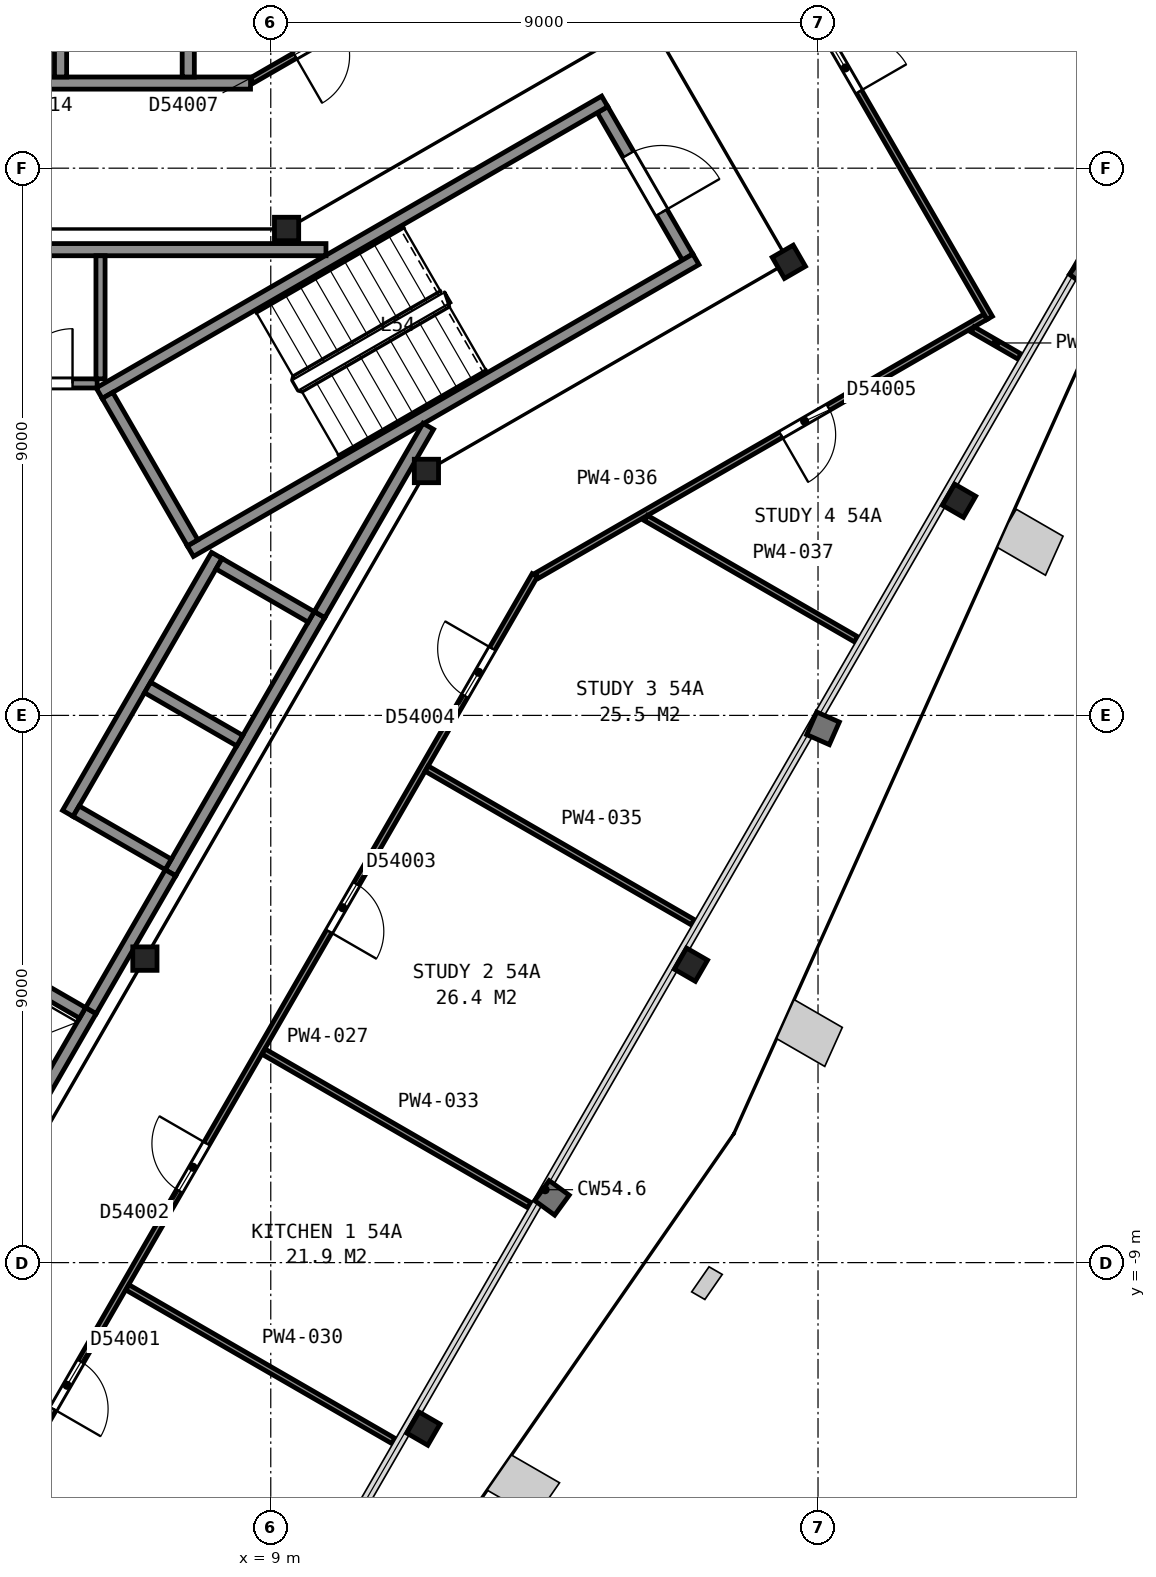
"""IFC4 building model, lengths in metres.
Left out: names, types, materials, properties, quantities, classifications, styles, units other than length and angle.
Written with IfcOpenShell. Run it as: python <this file> out.ifc"""

import sys

from ifc_helpers import new_model, si_unit, direction, frame, frame_2d, origin, origin_2d, place, context, subcontext, project, spatial, rectangle, i_section, extrude, element, fill, save


model = new_model("IFC4")
c1 = context("Model", 3, precision=1e-05, world=origin(), true_north=direction((0.0, 1.0)))
c2 = subcontext(c1, "Body", "Model", "MODEL_VIEW")
j1 = project(units=[si_unit("LENGTHUNIT", "METRE"), si_unit("PLANEANGLEUNIT", "RADIAN")], contexts=[c1])
p1 = place(None, origin())
s1 = spatial("IfcSite", under=j1, at=p1, CompositionType="ELEMENT")
p2 = place(p1, origin())
s2 = spatial("IfcBuilding", under=s1, at=p2, CompositionType="ELEMENT")
p3 = place(p2, frame((0.0, 0.0, 217.5)))
s3 = spatial("IfcBuildingStorey", under=s2, at=p3, CompositionType="ELEMENT", Elevation=217.5)
for number, where, z_axis, x_axis in (
    (1, (11.51, -11.73, 0.035), (0.0, 0.0, 1.0), (-0.5, -0.866, 0.0)),
    (2, (15.91, -4.1, 0.035), (0.0, 0.0, 1.0), (-0.5, -0.866, 0.0)),
):
    element("IfcColumn", number, at=place(p3, frame(where, z_axis=z_axis, x_axis=x_axis)), inside=s3, PredefinedType="COLUMN", context=c2, shape_type="SweptSolid", body=[
        extrude(i_section(OverallWidth=0.401, OverallDepth=0.399, WebThickness=0.025, FlangeThickness=0.04, FilletRadius=0.015, at=origin_2d()), origin(), (0.0, 0.0, 1.0), 3.665),
    ])
p4 = place(p3, frame((20.32, 3.53, 0.04), z_axis=(0.0, 0.0, 1.0), x_axis=(-0.5, -0.866025403784, 0.0)))
e3 = element("IfcColumn", 3, at=p4, inside=s3, PredefinedType="COLUMN", context=c2, shape_type="SweptSolid", body=[
    extrude(i_section(OverallWidth=0.401, OverallDepth=0.399, WebThickness=0.025, FlangeThickness=0.04, FilletRadius=0.015, at=origin_2d()), origin(), (0.0, 0.0, 1.0), 3.66),
])
p5 = place(p3, frame((11.56, 4.02, 0.0), z_axis=(0.0, 0.0, 1.0), x_axis=(1.0, 0.0, 0.0)))
e4 = element("IfcColumn", 4, at=p5, inside=s3, PredefinedType="COLUMN", context=c2, shape_type="SweptSolid", body=[
    extrude(i_section(OverallWidth=0.399, OverallDepth=0.386, WebThickness=0.021, FlangeThickness=0.033, FilletRadius=0.015, at=origin_2d()), origin(), (0.0, 0.0, 1.0), 3.7),
])
p6 = place(p3, frame((17.52, 7.46, 0.0), z_axis=(0.0, 0.0, 1.0), x_axis=(0.5, -0.866025403784, 0.0)))
e5 = element("IfcColumn", 5, at=p6, inside=s3, PredefinedType="COLUMN", context=c2, shape_type="SweptSolid", body=[
    extrude(i_section(OverallWidth=0.401, OverallDepth=0.399, WebThickness=0.025, FlangeThickness=0.04, FilletRadius=0.015, at=origin_2d()), origin(), (0.0, 0.0, 1.0), 3.7),
])
for number, where, z_axis, x_axis in (
    (6, (9.26, 8.0, 0.0), (0.0, 0.0, 1.0), (1.0, 0.0, 0.0)),
    (7, (6.93, -4.0, 0.0), (0.0, 0.0, 1.0), (1.0, 0.0, 0.0)),
):
    element("IfcColumn", number, at=place(p3, frame(where, z_axis=z_axis, x_axis=x_axis)), inside=s3, PredefinedType="COLUMN", context=c2, shape_type="SweptSolid", body=[
        extrude(i_section(OverallWidth=0.399, OverallDepth=0.386, WebThickness=0.021, FlangeThickness=0.033, FilletRadius=0.015, at=origin_2d()), origin(), (0.0, 0.0, 1.0), 3.7),
    ])
p7 = place(p3, frame((15.855, 7.538, 0.0), z_axis=(0.0, 0.0, 1.0), x_axis=(-0.500049511043, 0.865996816683, 0.0)))
e8 = element("IfcWall", 8, at=p7, inside=s3, PredefinedType="PARTITIONING", context=c2, shape_type="SweptSolid", body=[
    extrude(rectangle(XDim=2.8, YDim=0.2, at=frame_2d((1.4, 0.0))), origin(), (0.0, 0.0, 1.0), 3.45),
])
p8 = place(p7, frame((0.85, 0.0, 0.0)))
e9 = element("IfcOpeningElement", 9, at=p8, cuts=e8, PredefinedType="OPENING", context=c2, shape_type="SweptSolid", body=[
    extrude(rectangle(XDim=1.1, YDim=2.1, at=frame_2d((0.55, 1.05))), frame((0.0, 0.11, 0.0), z_axis=(0.0, -1.0, 0.0), x_axis=(1.0, 0.0, 0.0)), (0.0, 0.0, 1.0), 0.22),
])
for number, where, z_axis, x_axis in (
    (10, (6.178, 5.299, 0.0), (0.0, 0.0, 1.0), (0.866, 0.5, 0.0)),
    (11, (7.678, 2.701, 0.0), (0.0, 0.0, 1.0), (0.866, 0.5, 0.0)),
):
    element("IfcWall", number, at=place(p3, frame(where, z_axis=z_axis, x_axis=x_axis)), inside=s3, PredefinedType="PARTITIONING", context=c2, shape_type="SweptSolid", body=[
        extrude(rectangle(XDim=9.6, YDim=0.2, at=frame_2d((4.8, 0.0))), origin(), (0.0, 0.0, 1.0), 3.45),
    ])
p9 = place(p3, frame((7.715, 2.838, 0.0), z_axis=(0.0, 0.0, 1.0), x_axis=(-0.500049511043, 0.865996816683, 0.0)))
e12 = element("IfcWall", 12, at=p9, inside=s3, PredefinedType="PARTITIONING", context=c2, shape_type="SweptSolid", body=[
    extrude(rectangle(XDim=2.8, YDim=0.2, at=frame_2d((1.4, 0.0))), origin(), (0.0, 0.0, 1.0), 3.45),
])
p10 = place(p3, frame((4.766, -7.065, 0.0), z_axis=(0.0, 0.0, 1.0), x_axis=(0.499948979701, 0.866054858364, 0.0)))
e13 = element("IfcWall", 13, at=p10, inside=s3, PredefinedType="PARTITIONING", context=c2, shape_type="SweptSolid", body=[
    extrude(rectangle(XDim=2.55, YDim=0.2, at=frame_2d((1.275, 0.0))), origin(), (0.0, 0.0, 1.0), 3.7),
])
p11 = place(p3, frame((7.351, -2.587, 0.0), z_axis=(0.0, 0.0, 1.0), x_axis=(0.500002801628, 0.866023786258, 0.0)))
e14 = element("IfcWall", 14, at=p11, inside=s3, PredefinedType="PARTITIONING", context=c2, shape_type="SweptSolid", body=[
    extrude(rectangle(XDim=4.9, YDim=0.2, at=frame_2d((2.45, 0.0))), origin(), (0.0, 0.0, 1.0), 3.7),
])
p12 = place(p3, frame((5.663, -1.612, 0.0), z_axis=(0.0, 0.0, 1.0), x_axis=(0.49998122708, 0.866036242063, 0.0)))
e15 = element("IfcWall", 15, at=p12, inside=s3, PredefinedType="PARTITIONING", context=c2, shape_type="SweptSolid", body=[
    extrude(rectangle(XDim=4.9, YDim=0.2, at=frame_2d((2.45, 0.0))), origin(), (0.0, 0.0, 1.0), 3.7),
])
p13 = place(p3, frame((9.665, 1.62, 0.0), z_axis=(0.0, 0.0, 1.0), x_axis=(-0.866002029911, 0.500040482552, 0.0)))
e16 = element("IfcWall", 16, at=p13, inside=s3, PredefinedType="PARTITIONING", context=c2, shape_type="SweptSolid", body=[
    extrude(rectangle(XDim=1.75, YDim=0.2, at=frame_2d((0.875, 0.0))), origin(), (0.0, 0.0, 1.0), 3.7),
])
for number, where, z_axis, x_axis in (
    (17, (8.49, -0.416, 0.0), (0.0, 0.0, 1.0), (-0.866, 0.5, 0.0)),
    (18, (7.315, -2.451, 0.0), (0.0, 0.0, 1.0), (-0.866, 0.5, 0.0)),
):
    element("IfcWall", number, at=place(p3, frame(where, z_axis=z_axis, x_axis=x_axis)), inside=s3, PredefinedType="PARTITIONING", context=c2, shape_type="SweptSolid", body=[
        extrude(rectangle(XDim=1.75, YDim=0.2, at=frame_2d((0.875, 0.0))), origin(), (0.0, 0.0, 1.0), 3.7),
    ])
p14 = place(p3, frame((5.905, -4.893, 0.0), z_axis=(0.0, 0.0, 1.0), x_axis=(-0.866002029911, 0.500040482552, 0.0)))
e19 = element("IfcWall", 19, at=p14, inside=s3, PredefinedType="PARTITIONING", context=c2, shape_type="SweptSolid", body=[
    extrude(rectangle(XDim=1.75, YDim=0.2, at=frame_2d((0.875, 0.0))), origin(), (0.0, 0.0, 1.0), 3.7),
])
p15 = place(p3, frame((-3.933, 7.66, 0.0), z_axis=(0.0, 0.0, 1.0), x_axis=(1.0, 0.0, 0.0)))
e20 = element("IfcWall", 20, at=p15, inside=s3, PredefinedType="PARTITIONING", context=c2, shape_type="SweptSolid", body=[
    extrude(rectangle(XDim=13.841, YDim=0.2, at=frame_2d((6.92, 0.0))), origin(), (0.0, 0.0, 1.0), 3.45),
])
p16 = place(p3, frame((0.925, 5.46, 0.0), z_axis=(0.0, 0.0, 1.0), x_axis=(1.0, 0.0, 0.0)))
e21 = element("IfcWall", 21, at=p16, inside=s3, PredefinedType="PARTITIONING", context=c2, shape_type="SweptSolid", body=[
    extrude(rectangle(XDim=5.22, YDim=0.15, at=frame_2d((2.61, 0.0))), origin(), (0.0, 0.0, 1.0), 3.45),
])
p17 = place(p16, frame((3.915, 0.0, 0.0)))
e22 = element("IfcOpeningElement", 22, at=p17, cuts=e21, PredefinedType="OPENING", context=c2, shape_type="SweptSolid", body=[
    extrude(rectangle(XDim=0.9, YDim=2.1, at=frame_2d((0.45, 1.05))), frame((0.0, 0.085, 0.0), z_axis=(0.0, -1.0, 0.0), x_axis=(1.0, 0.0, 0.0)), (0.0, 0.0, 1.0), 0.17),
])
p18 = place(p3, frame((6.042, -4.855, 0.0), z_axis=(0.0, 0.0, 1.0), x_axis=(0.500252727967, 0.865879442048, 0.0)))
e23 = element("IfcWall", 23, at=p18, inside=s3, PredefinedType="PARTITIONING", context=c2, shape_type="SweptSolid", body=[
    extrude(rectangle(XDim=2.617, YDim=0.2, at=frame_2d((1.309, 0.0))), origin(), (0.0, 0.0, 1.0), 3.45),
])
p19 = place(p3, frame((6.2, 5.535, 0.0), z_axis=(0.0, 0.0, 1.0), x_axis=(0.0, 1.0, 0.0)))
e24 = element("IfcWall", 24, at=p19, inside=s3, PredefinedType="PARTITIONING", context=c2, shape_type="SweptSolid", body=[
    extrude(rectangle(XDim=2.025, YDim=0.15, at=frame_2d((1.013, 0.0))), origin(), (0.0, 0.0, 1.0), 3.45),
])
p20 = place(p3, frame((9.803, 1.658, 0.0), z_axis=(0.0, 0.0, 1.0), x_axis=(0.499943114462, 0.866058244174, 0.0)))
e25 = element("IfcWall", 25, at=p20, inside=s3, PredefinedType="PARTITIONING", context=c2, shape_type="SweptSolid", body=[
    extrude(rectangle(XDim=3.576, YDim=0.2, at=frame_2d((1.788, 0.0))), origin(), (0.0, 0.0, 1.0), 3.45),
])
p21 = place(p3, frame((-8.667, 10.4, 0.0), z_axis=(0.0, 0.0, 1.0), x_axis=(1.0, 0.0, 0.0)))
e26 = element("IfcWall", 26, at=p21, inside=s3, PredefinedType="PARTITIONING", context=c2, shape_type="SweptSolid", body=[
    extrude(rectangle(XDim=17.334, YDim=0.2, at=frame_2d((8.667, 0.0))), origin(), (0.0, 0.0, 1.0), 2.713),
])
p22 = place(p21, frame((9.252, 0.0, 0.0)))
e27 = element("IfcOpeningElement", 27, at=p22, cuts=e26, PredefinedType="OPENING", context=c2, shape_type="SweptSolid", body=[
    extrude(rectangle(XDim=0.9, YDim=2.1, at=frame_2d((0.45, 1.05))), frame((0.0, 0.11, 0.0), z_axis=(0.0, -1.0, 0.0), x_axis=(1.0, 0.0, 0.0)), (0.0, 0.0, 1.0), 0.22),
])
p23 = place(p21, frame((4.851, 0.0, 0.0)))
e28 = element("IfcOpeningElement", 28, at=p23, cuts=e26, PredefinedType="OPENING", context=c2, shape_type="SweptSolid", body=[
    extrude(rectangle(XDim=0.9, YDim=2.1, at=frame_2d((0.45, 1.05))), frame((0.0, 0.11, 0.0), z_axis=(0.0, -1.0, 0.0), x_axis=(1.0, 0.0, 0.0)), (0.0, 0.0, 1.0), 0.22),
])
p24 = place(p3, frame((13.342, 2.306, 0.0), z_axis=(0.0, 0.0, 1.0), x_axis=(-0.49997440863, -0.866040178465, 0.0)))
e29 = element("IfcWall", 29, at=p24, inside=s3, PredefinedType="PARTITIONING", context=c2, shape_type="SweptSolid", body=[
    extrude(rectangle(XDim=17.335, YDim=0.1, at=frame_2d((8.667, 0.0))), origin(), (0.0, 0.0, 1.0), 2.713),
])
p25 = place(p24, frame((14.935, 0.0, 0.0)))
e30 = element("IfcOpeningElement", 30, at=p25, cuts=e29, PredefinedType="OPENING", context=c2, shape_type="SweptSolid", body=[
    extrude(rectangle(XDim=0.9, YDim=2.1, at=frame_2d((0.45, 1.05))), frame((0.0, 0.06, 0.0), z_axis=(0.0, -1.0, 0.0), x_axis=(1.0, 0.0, 0.0)), (0.0, 0.0, 1.0), 0.12),
])
p26 = place(p24, frame((10.794, 0.0, 0.0)))
e31 = element("IfcOpeningElement", 31, at=p26, cuts=e29, PredefinedType="OPENING", context=c2, shape_type="SweptSolid", body=[
    extrude(rectangle(XDim=0.9, YDim=2.1, at=frame_2d((0.45, 1.05))), frame((0.0, 0.06, 0.0), z_axis=(0.0, -1.0, 0.0), x_axis=(1.0, 0.0, 0.0)), (0.0, 0.0, 1.0), 0.12),
])
p27 = place(p24, frame((5.866, 0.0, 0.0)))
e32 = element("IfcOpeningElement", 32, at=p27, cuts=e29, PredefinedType="OPENING", context=c2, shape_type="SweptSolid", body=[
    extrude(rectangle(XDim=0.9, YDim=2.1, at=frame_2d((0.45, 1.05))), frame((0.0, 0.06, 0.0), z_axis=(0.0, -1.0, 0.0), x_axis=(1.0, 0.0, 0.0)), (0.0, 0.0, 1.0), 0.12),
])
p28 = place(p24, frame((1.395, 0.0, 0.0)))
e33 = element("IfcOpeningElement", 33, at=p28, cuts=e29, PredefinedType="OPENING", context=c2, shape_type="SweptSolid", body=[
    extrude(rectangle(XDim=0.9, YDim=2.1, at=frame_2d((0.45, 1.05))), frame((0.0, 0.06, 0.0), z_axis=(0.0, -1.0, 0.0), x_axis=(1.0, 0.0, 0.0)), (0.0, 0.0, 1.0), 0.12),
])
p29 = place(p3, frame((5.543, 10.5, 0.0), z_axis=(0.0, 0.0, 1.0), x_axis=(0.0, 1.0, 0.0)))
e34 = element("IfcWall", 34, at=p29, inside=s3, PredefinedType="PARTITIONING", context=c2, shape_type="SweptSolid", body=[
    extrude(rectangle(XDim=5.006, YDim=0.2, at=frame_2d((2.503, 0.0))), origin(), (0.0, 0.0, 1.0), 2.713),
])
p30 = place(p3, frame((6.643, -9.407, 0.0), z_axis=(0.0, 0.0, 1.0), x_axis=(0.866056765328, -0.499945676278, 0.0)))
e35 = element("IfcWall", 35, at=p30, inside=s3, PredefinedType="PARTITIONING", context=c2, shape_type="SweptSolid", body=[
    extrude(rectangle(XDim=5.049, YDim=0.1, at=frame_2d((2.525, 0.0))), origin(), (0.0, 0.0, 1.0), 2.713),
])
p31 = place(p3, frame((7.643, 10.5, 0.0), z_axis=(0.0, 0.0, 1.0), x_axis=(0.0, 1.0, 0.0)))
e36 = element("IfcWall", 36, at=p31, inside=s3, PredefinedType="PARTITIONING", context=c2, shape_type="SweptSolid", body=[
    extrude(rectangle(XDim=2.8, YDim=0.2, at=frame_2d((1.4, 0.0))), origin(), (0.0, 0.0, 1.0), 2.713),
])
p32 = place(p3, frame((8.691, 10.442, 0.0), z_axis=(0.0, 0.0, 1.0), x_axis=(0.866070360466, 0.499922124658, 0.0)))
e37 = element("IfcWall", 37, at=p32, inside=s3, PredefinedType="PARTITIONING", context=c2, shape_type="SweptSolid", body=[
    extrude(rectangle(XDim=8.503, YDim=0.1, at=frame_2d((4.251, 0.0))), origin(), (0.0, 0.0, 1.0), 2.713),
])
p33 = place(p32, frame((0.815, 0.0, 0.0)))
e38 = element("IfcOpeningElement", 38, at=p33, cuts=e37, PredefinedType="OPENING", context=c2, shape_type="SweptSolid", body=[
    extrude(rectangle(XDim=0.9, YDim=2.1, at=frame_2d((0.45, 1.05))), frame((0.0, 0.06, 0.0), z_axis=(0.0, -1.0, 0.0), x_axis=(1.0, 0.0, 0.0)), (0.0, 0.0, 1.0), 0.12),
])
p34 = place(p3, frame((8.882, -5.53, 0.0), z_axis=(0.0, 0.0, 1.0), x_axis=(0.865915800513, -0.500189790402, 0.0)))
e39 = element("IfcWall", 39, at=p34, inside=s3, PredefinedType="PARTITIONING", context=c2, shape_type="SweptSolid", body=[
    extrude(rectangle(XDim=5.049, YDim=0.1, at=frame_2d((2.525, 0.0))), origin(), (0.0, 0.0, 1.0), 2.713),
])
p35 = place(p3, frame((11.563, -0.875, 0.0), z_axis=(0.0, 0.0, 1.0), x_axis=(0.866052865344, -0.499952432166, 0.0)))
e40 = element("IfcWall", 40, at=p35, inside=s3, PredefinedType="PARTITIONING", context=c2, shape_type="SweptSolid", body=[
    extrude(rectangle(XDim=5.054, YDim=0.1, at=frame_2d((2.527, 0.0))), origin(), (0.0, 0.0, 1.0), 2.713),
])
p36 = place(p3, frame((20.756, 6.557, 0.0), z_axis=(0.0, 0.0, 1.0), x_axis=(-0.866069146081, -0.499924228466, 0.0)))
e41 = element("IfcWall", 41, at=p36, inside=s3, PredefinedType="PARTITIONING", context=c2, shape_type="SweptSolid", body=[
    extrude(rectangle(XDim=8.519, YDim=0.1, at=frame_2d((4.259, 0.0))), origin(), (0.0, 0.0, 1.0), 2.713),
])
p37 = place(p36, frame((2.986, 0.0, 0.0)))
e42 = element("IfcOpeningElement", 42, at=p37, cuts=e41, PredefinedType="OPENING", context=c2, shape_type="SweptSolid", body=[
    extrude(rectangle(XDim=0.9, YDim=2.1, at=frame_2d((0.45, 1.05))), frame((0.0, 0.06, 0.0), z_axis=(0.0, -1.0, 0.0), x_axis=(1.0, 0.0, 0.0)), (0.0, 0.0, 1.0), 0.12),
])
p38 = place(p3, frame((15.17, 3.246, 0.0), z_axis=(0.0, 0.0, 1.0), x_axis=(0.866149939141, -0.499784236372, 0.0)))
e43 = element("IfcWall", 43, at=p38, inside=s3, PredefinedType="PARTITIONING", context=c2, shape_type="SweptSolid", body=[
    extrude(rectangle(XDim=3.991, YDim=0.1, at=frame_2d((1.996, 0.0))), origin(), (0.0, 0.0, 1.0), 2.713),
])
p39 = place(p3, frame((16.073, 14.761, 0.0), z_axis=(0.0, 0.0, 1.0), x_axis=(0.500297300687, -0.865853689098, 0.0)))
e44 = element("IfcWall", 44, at=p39, inside=s3, PredefinedType="PARTITIONING", context=c2, shape_type="SweptSolid", body=[
    extrude(rectangle(XDim=9.496, YDim=0.1, at=frame_2d((4.748, 0.0))), origin(), (0.0, 0.0, 1.0), 2.713),
])
p40 = place(p39, frame((4.3, 0.0, 0.0)))
e45 = element("IfcOpeningElement", 45, at=p40, cuts=e44, PredefinedType="OPENING", context=c2, shape_type="SweptSolid", body=[
    extrude(rectangle(XDim=0.9, YDim=2.1, at=frame_2d((0.45, 1.05))), frame((0.0, 0.06, 0.0), z_axis=(0.0, -1.0, 0.0), x_axis=(1.0, 0.0, 0.0)), (0.0, 0.0, 1.0), 0.12),
])
p41 = place(p3, frame((20.543, 6.348, 0.0), z_axis=(0.0, 0.0, 1.0), x_axis=(0.865952303503, -0.500126592033, 0.0)))
e46 = element("IfcWall", 46, at=p41, inside=s3, PredefinedType="PARTITIONING", context=c2, shape_type="SweptSolid", body=[
    extrude(rectangle(XDim=0.889, YDim=0.1, at=frame_2d((0.444, 0.0))), origin(), (0.0, 0.0, 1.0), 2.713),
])
p42 = place(p8, origin())
e47 = element("IfcDoor", 47, at=p42, inside=s3, OperationType="SINGLE_SWING_LEFT", PredefinedType="DOOR", context=c2, shape_type="SweptSolid", body=[
    extrude(rectangle(XDim=1.1, YDim=2.1, at=frame_2d((0.55, 1.05))), frame((0.0, 0.025, 0.0), z_axis=(0.0, -1.0, 0.0), x_axis=(1.0, 0.0, 0.0)), (0.0, 0.0, 1.0), 0.05),
])
fill(e9, e47)
p43 = place(p17, origin())
e48 = element("IfcDoor", 48, at=p43, inside=s3, OperationType="SINGLE_SWING_RIGHT", PredefinedType="DOOR", context=c2, shape_type="SweptSolid", body=[
    extrude(rectangle(XDim=0.9, YDim=2.1, at=frame_2d((0.45, 1.05))), frame((0.0, 0.025, 0.0), z_axis=(0.0, -1.0, 0.0), x_axis=(1.0, 0.0, 0.0)), (0.0, 0.0, 1.0), 0.05),
])
fill(e22, e48)
p44 = place(p25, origin())
e49 = element("IfcDoor", 49, at=p44, inside=s3, OperationType="SINGLE_SWING_RIGHT", PredefinedType="DOOR", context=c2, shape_type="SweptSolid", body=[
    extrude(rectangle(XDim=0.9, YDim=2.1, at=frame_2d((0.45, 1.05))), frame((0.0, 0.025, 0.0), z_axis=(0.0, -1.0, 0.0), x_axis=(1.0, 0.0, 0.0)), (0.0, 0.0, 1.0), 0.05),
])
fill(e30, e49)
p45 = place(p26, origin())
e50 = element("IfcDoor", 50, at=p45, inside=s3, OperationType="SINGLE_SWING_LEFT", PredefinedType="DOOR", context=c2, shape_type="SweptSolid", body=[
    extrude(rectangle(XDim=0.9, YDim=2.1, at=frame_2d((0.45, 1.05))), frame((0.0, 0.025, 0.0), z_axis=(0.0, -1.0, 0.0), x_axis=(1.0, 0.0, 0.0)), (0.0, 0.0, 1.0), 0.05),
])
fill(e31, e50)
p46 = place(p27, origin())
e51 = element("IfcDoor", 51, at=p46, inside=s3, OperationType="SINGLE_SWING_RIGHT", PredefinedType="DOOR", context=c2, shape_type="SweptSolid", body=[
    extrude(rectangle(XDim=0.9, YDim=2.1, at=frame_2d((0.45, 1.05))), frame((0.0, 0.025, 0.0), z_axis=(0.0, -1.0, 0.0), x_axis=(1.0, 0.0, 0.0)), (0.0, 0.0, 1.0), 0.05),
])
fill(e32, e51)
p47 = place(p28, origin())
e52 = element("IfcDoor", 52, at=p47, inside=s3, OperationType="SINGLE_SWING_LEFT", PredefinedType="DOOR", context=c2, shape_type="SweptSolid", body=[
    extrude(rectangle(XDim=0.9, YDim=2.1, at=frame_2d((0.45, 1.05))), frame((0.0, 0.025, 0.0), z_axis=(0.0, -1.0, 0.0), x_axis=(1.0, 0.0, 0.0)), (0.0, 0.0, 1.0), 0.05),
])
fill(e33, e52)
p48 = place(p33, origin())
e53 = element("IfcDoor", 53, at=p48, inside=s3, OperationType="SINGLE_SWING_LEFT", PredefinedType="DOOR", context=c2, shape_type="SweptSolid", body=[
    extrude(rectangle(XDim=0.9, YDim=2.1, at=frame_2d((0.45, 1.05))), frame((0.0, 0.025, 0.0), z_axis=(0.0, -1.0, 0.0), x_axis=(1.0, 0.0, 0.0)), (0.0, 0.0, 1.0), 0.05),
])
fill(e38, e53)
p49 = place(p37, origin())
e54 = element("IfcDoor", 54, at=p49, inside=s3, OperationType="SINGLE_SWING_RIGHT", PredefinedType="DOOR", context=c2, shape_type="SweptSolid", body=[
    extrude(rectangle(XDim=0.9, YDim=2.1, at=frame_2d((0.45, 1.05))), frame((0.0, 0.025, 0.0), z_axis=(0.0, -1.0, 0.0), x_axis=(1.0, 0.0, 0.0)), (0.0, 0.0, 1.0), 0.05),
])
fill(e42, e54)
p50 = place(p40, origin())
e55 = element("IfcDoor", 55, at=p50, inside=s3, OperationType="SINGLE_SWING_RIGHT", PredefinedType="DOOR", context=c2, shape_type="SweptSolid", body=[
    extrude(rectangle(XDim=0.9, YDim=2.1, at=frame_2d((0.45, 1.05))), frame((0.0, 0.025, 0.0), z_axis=(0.0, -1.0, 0.0), x_axis=(1.0, 0.0, 0.0)), (0.0, 0.0, 1.0), 0.05),
])
fill(e45, e55)
save(model, sys.argv[1])
